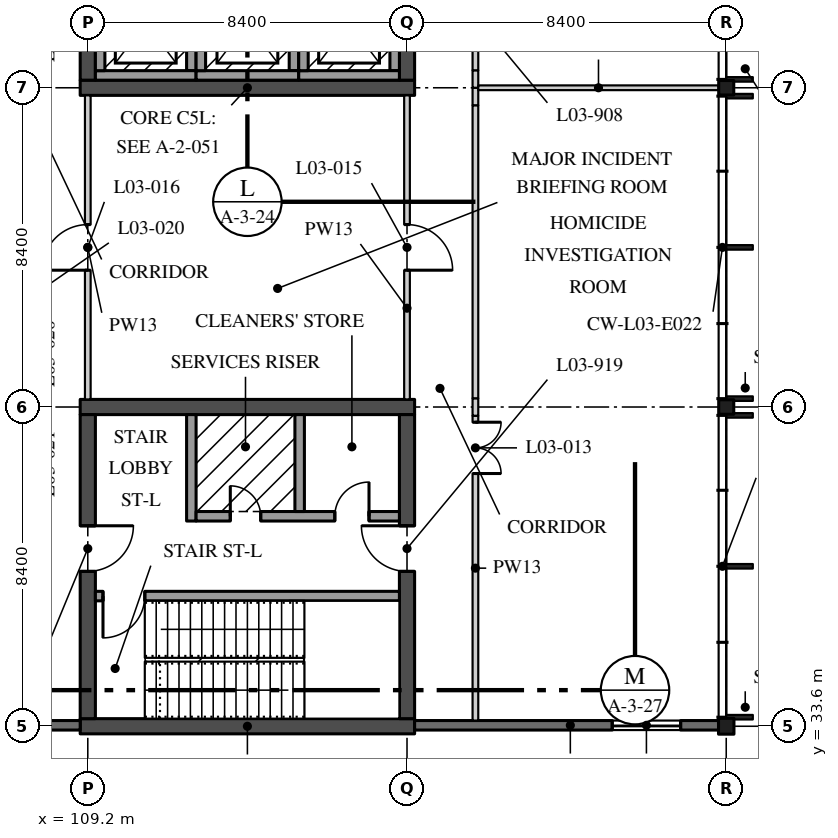
"""IFC4 building model, lengths in metres.
Left out: names, types, materials, properties, quantities, classifications, styles, units other than length and angle.
Written with IfcOpenShell. Run it as: python <this file> out.ifc"""

import sys

from ifc_helpers import new_model, si_unit, direction, frame, frame_2d, origin, origin_2d, place, context, subcontext, project, spatial, rectangle, i_section, extrude, element, fill, save


model = new_model("IFC4")
c1 = context("Model", 3, precision=1e-05, world=origin(), true_north=direction((0.0, 1.0)))
c2 = subcontext(c1, "Body", "Model", "MODEL_VIEW")
j1 = project(units=[si_unit("LENGTHUNIT", "METRE"), si_unit("PLANEANGLEUNIT", "RADIAN")], contexts=[c1])
p1 = place(None, origin())
s1 = spatial("IfcSite", under=j1, at=p1, CompositionType="ELEMENT")
p2 = place(p1, origin())
s2 = spatial("IfcBuilding", under=s1, at=p2, CompositionType="ELEMENT")
p3 = place(p2, frame((0.0, 0.0, 14.4)))
s3 = spatial("IfcBuildingStorey", under=s2, at=p3, CompositionType="ELEMENT", Elevation=14.4)
p4 = place(p3, frame((126.0, 33.6, 0.0), z_axis=(0.0, 0.0, 1.0), x_axis=(1.0, 0.0, 0.0)))
e1 = element("IfcColumn", 1, at=p4, inside=s3, PredefinedType="COLUMN", context=c2, shape_type="SweptSolid", body=[
    extrude(i_section(OverallWidth=0.406, OverallDepth=0.417, WebThickness=0.03, FlangeThickness=0.048, FilletRadius=0.015, at=origin_2d()), origin(), (0.0, 0.0, 1.0), 4.37),
])
for number, where, z_axis, x_axis in (
    (2, (126.0, 42.0, 0.0), (0.0, 0.0, 1.0), (1.0, 0.0, 0.0)),
    (3, (126.0, 50.4, 0.0), (0.0, 0.0, 1.0), (1.0, 0.0, 0.0)),
):
    element("IfcColumn", number, at=place(p3, frame(where, z_axis=z_axis, x_axis=x_axis)), inside=s3, PredefinedType="COLUMN", context=c2, shape_type="SweptSolid", body=[
        extrude(i_section(OverallWidth=0.396, OverallDepth=0.381, WebThickness=0.019, FlangeThickness=0.03, FilletRadius=0.015, at=origin_2d()), origin(), (0.0, 0.0, 1.0), 4.37),
    ])
p5 = place(p3, frame((109.0, 50.4, 0.0), z_axis=(0.0, 0.0, 1.0), x_axis=(1.0, 0.0, 0.0)))
e4 = element("IfcWall", 4, at=p5, inside=s3, PredefinedType="SHEAR", context=c2, shape_type="SweptSolid", body=[
    extrude(rectangle(XDim=8.8, YDim=0.4, at=frame_2d((4.4, 0.0))), origin(), (0.0, 0.0, 1.0), 4.37),
])
p6 = place(p3, frame((109.2, 50.6, 0.0), z_axis=(0.0, 0.0, 1.0), x_axis=(0.0, 1.0, 0.0)))
e5 = element("IfcWall", 5, at=p6, inside=s3, PredefinedType="SHEAR", context=c2, shape_type="SweptSolid", body=[
    extrude(rectangle(XDim=8.0, YDim=0.4, at=frame_2d((4.0, 0.0))), origin(), (0.0, 0.0, 1.0), 4.37),
])
p7 = place(p6, frame((3.25, 0.0, 0.0)))
e6 = element("IfcOpeningElement", 6, at=p7, cuts=e5, PredefinedType="OPENING", context=c2, shape_type="SweptSolid", body=[
    extrude(rectangle(XDim=1.2, YDim=2.1, at=frame_2d((0.6, 1.05))), frame((0.0, 0.21, 0.0), z_axis=(0.0, -1.0, 0.0), x_axis=(1.0, 0.0, 0.0)), (0.0, 0.0, 1.0), 0.42),
])
p8 = place(p3, frame((117.6, 50.6, 0.0), z_axis=(0.0, 0.0, 1.0), x_axis=(0.0, 1.0, 0.0)))
e7 = element("IfcWall", 7, at=p8, inside=s3, PredefinedType="SHEAR", context=c2, shape_type="SweptSolid", body=[
    extrude(rectangle(XDim=8.0, YDim=0.4, at=frame_2d((4.0, 0.0))), origin(), (0.0, 0.0, 1.0), 4.37),
])
p9 = place(p8, frame((3.25, 0.0, 0.0)))
e8 = element("IfcOpeningElement", 8, at=p9, cuts=e7, PredefinedType="OPENING", context=c2, shape_type="SweptSolid", body=[
    extrude(rectangle(XDim=1.2, YDim=2.1, at=frame_2d((0.6, 1.05))), frame((0.0, 0.21, 0.0), z_axis=(0.0, -1.0, 0.0), x_axis=(1.0, 0.0, 0.0)), (0.0, 0.0, 1.0), 0.42),
])
p10 = place(p8, frame((6.0, 0.0, 0.0)))
e9 = element("IfcOpeningElement", 9, at=p10, cuts=e7, PredefinedType="OPENING", context=c2, shape_type="SweptSolid", body=[
    extrude(rectangle(XDim=1.2, YDim=2.1, at=frame_2d((0.6, 1.05))), frame((0.0, 0.21, 0.0), z_axis=(0.0, -1.0, 0.0), x_axis=(1.0, 0.0, 0.0)), (0.0, 0.0, 1.0), 0.42),
])
for number, where, z_axis, x_axis in (
    (10, (109.0, 33.6, 0.0), (0.0, 0.0, 1.0), (1.0, 0.0, 0.0)),
    (11, (109.0, 42.0, 0.0), (0.0, 0.0, 1.0), (1.0, 0.0, 0.0)),
):
    element("IfcWall", number, at=place(p3, frame(where, z_axis=z_axis, x_axis=x_axis)), inside=s3, PredefinedType="SHEAR", context=c2, shape_type="SweptSolid", body=[
        extrude(rectangle(XDim=8.8, YDim=0.4, at=frame_2d((4.4, 0.0))), origin(), (0.0, 0.0, 1.0), 4.37),
    ])
p11 = place(p3, frame((109.2, 33.8, 0.0), z_axis=(0.0, 0.0, 1.0), x_axis=(0.0, 1.0, 0.0)))
e12 = element("IfcWall", 12, at=p11, inside=s3, PredefinedType="SHEAR", context=c2, shape_type="SweptSolid", body=[
    extrude(rectangle(XDim=8.0, YDim=0.4, at=frame_2d((4.0, 0.0))), origin(), (0.0, 0.0, 1.0), 4.37),
])
p12 = place(p11, frame((3.875, 0.0, 0.0)))
e13 = element("IfcOpeningElement", 13, at=p12, cuts=e12, PredefinedType="OPENING", context=c2, shape_type="SweptSolid", body=[
    extrude(rectangle(XDim=1.2, YDim=2.1, at=frame_2d((0.6, 1.05))), frame((0.0, 0.21, 0.0), z_axis=(0.0, -1.0, 0.0), x_axis=(1.0, 0.0, 0.0)), (0.0, 0.0, 1.0), 0.42),
])
p13 = place(p3, frame((117.6, 33.8, 0.0), z_axis=(0.0, 0.0, 1.0), x_axis=(0.0, 1.0, 0.0)))
e14 = element("IfcWall", 14, at=p13, inside=s3, PredefinedType="SHEAR", context=c2, shape_type="SweptSolid", body=[
    extrude(rectangle(XDim=8.0, YDim=0.4, at=frame_2d((4.0, 0.0))), origin(), (0.0, 0.0, 1.0), 4.37),
])
p14 = place(p13, frame((3.875, 0.0, 0.0)))
e15 = element("IfcOpeningElement", 15, at=p14, cuts=e14, PredefinedType="OPENING", context=c2, shape_type="SweptSolid", body=[
    extrude(rectangle(XDim=1.2, YDim=2.1, at=frame_2d((0.6, 1.05))), frame((0.0, 0.21, 0.0), z_axis=(0.0, -1.0, 0.0), x_axis=(1.0, 0.0, 0.0)), (0.0, 0.0, 1.0), 0.42),
])
p15 = place(p3, frame((109.4, 37.025, 0.0), z_axis=(0.0, 0.0, 1.0), x_axis=(1.0, 0.0, 0.0)))
e16 = element("IfcWall", 16, at=p15, inside=s3, PredefinedType="SOLIDWALL", context=c2, shape_type="SweptSolid", body=[
    extrude(rectangle(XDim=8.0, YDim=0.25, at=frame_2d((4.0, 0.0))), origin(), (0.0, 0.0, 1.0), 4.37),
])
p16 = place(p15, frame((0.2, 0.0, 0.0)))
e17 = element("IfcOpeningElement", 17, at=p16, cuts=e16, PredefinedType="OPENING", context=c2, shape_type="SweptSolid", body=[
    extrude(rectangle(XDim=1.1, YDim=2.1, at=frame_2d((0.55, 1.05))), frame((0.0, 0.135, 0.0), z_axis=(0.0, -1.0, 0.0), x_axis=(1.0, 0.0, 0.0)), (0.0, 0.0, 1.0), 0.27),
])
p17 = place(p3, frame((111.925, 39.0, 0.0), z_axis=(0.0, 0.0, 1.0), x_axis=(0.0, 1.0, 0.0)))
e18 = element("IfcWall", 18, at=p17, inside=s3, PredefinedType="SOLIDWALL", context=c2, shape_type="SweptSolid", body=[
    extrude(rectangle(XDim=2.8, YDim=0.25, at=frame_2d((1.4, 0.0))), origin(), (0.0, 0.0, 1.0), 4.37),
])
p18 = place(p3, frame((112.05, 39.125, 0.0), z_axis=(0.0, 0.0, 1.0), x_axis=(1.0, 0.0, 0.0)))
e19 = element("IfcWall", 19, at=p18, inside=s3, PredefinedType="SOLIDWALL", context=c2, shape_type="SweptSolid", body=[
    extrude(rectangle(XDim=5.35, YDim=0.25, at=frame_2d((2.675, 0.0))), origin(), (0.0, 0.0, 1.0), 4.37),
])
p19 = place(p18, frame((3.65, 0.0, 0.0)))
e20 = element("IfcOpeningElement", 20, at=p19, cuts=e19, PredefinedType="OPENING", context=c2, shape_type="SweptSolid", body=[
    extrude(rectangle(XDim=0.9, YDim=2.1, at=frame_2d((0.45, 1.05))), frame((0.0, 0.135, 0.0), z_axis=(0.0, -1.0, 0.0), x_axis=(1.0, 0.0, 0.0)), (0.0, 0.0, 1.0), 0.27),
])
p20 = place(p18, frame((0.9, 0.0, 0.0)))
e21 = element("IfcOpeningElement", 21, at=p20, cuts=e19, PredefinedType="OPENING", context=c2, shape_type="SweptSolid", body=[
    extrude(rectangle(XDim=0.8, YDim=2.1, at=frame_2d((0.4, 1.05))), frame((0.0, 0.135, 0.0), z_axis=(0.0, -1.0, 0.0), x_axis=(1.0, 0.0, 0.0)), (0.0, 0.0, 1.0), 0.27),
])
p21 = place(p3, frame((114.775, 39.25, 0.0), z_axis=(0.0, 0.0, 1.0), x_axis=(0.0, 1.0, 0.0)))
e22 = element("IfcWall", 22, at=p21, inside=s3, PredefinedType="SOLIDWALL", context=c2, shape_type="SweptSolid", body=[
    extrude(rectangle(XDim=2.55, YDim=0.25, at=frame_2d((1.275, 0.0))), origin(), (0.0, 0.0, 1.0), 4.37),
])
p22 = place(p3, frame((111.925, 50.85, 0.0), z_axis=(0.0, 0.0, 1.0), x_axis=(0.0, 1.0, 0.0)))
e23 = element("IfcWall", 23, at=p22, inside=s3, PredefinedType="SOLIDWALL", context=c2, shape_type="SweptSolid", body=[
    extrude(rectangle(XDim=2.3, YDim=0.25, at=frame_2d((1.15, 0.0))), origin(), (0.0, 0.0, 1.0), 4.37),
])
p23 = place(p3, frame((109.4, 50.725, 0.0), z_axis=(0.0, 0.0, 1.0), x_axis=(1.0, 0.0, 0.0)))
e24 = element("IfcWall", 24, at=p23, inside=s3, PredefinedType="SOLIDWALL", context=c2, shape_type="SweptSolid", body=[
    extrude(rectangle(XDim=2.65, YDim=0.25, at=frame_2d((1.325, 0.0))), origin(), (0.0, 0.0, 1.0), 4.37),
])
for number, where, z_axis, x_axis in (
    (25, (109.525, 50.85, 0.0), (0.0, 0.0, 1.0), (0.0, 1.0, 0.0)),
    (26, (114.625, 50.85, 0.0), (0.0, 0.0, 1.0), (0.0, 1.0, 0.0)),
):
    element("IfcWall", number, at=place(p3, frame(where, z_axis=z_axis, x_axis=x_axis)), inside=s3, PredefinedType="SOLIDWALL", context=c2, shape_type="SweptSolid", body=[
        extrude(rectangle(XDim=2.3, YDim=0.25, at=frame_2d((1.15, 0.0))), origin(), (0.0, 0.0, 1.0), 4.37),
    ])
p24 = place(p3, frame((112.05, 50.725, 0.0), z_axis=(0.0, 0.0, 1.0), x_axis=(1.0, 0.0, 0.0)))
e27 = element("IfcWall", 27, at=p24, inside=s3, PredefinedType="SOLIDWALL", context=c2, shape_type="SweptSolid", body=[
    extrude(rectangle(XDim=2.7, YDim=0.25, at=frame_2d((1.35, 0.0))), origin(), (0.0, 0.0, 1.0), 4.37),
])
for number, where, z_axis, x_axis in (
    (28, (112.175, 50.85, 0.0), (0.0, 0.0, 1.0), (0.0, 1.0, 0.0)),
    (29, (117.275, 50.85, 0.0), (0.0, 0.0, 1.0), (0.0, 1.0, 0.0)),
):
    element("IfcWall", number, at=place(p3, frame(where, z_axis=z_axis, x_axis=x_axis)), inside=s3, PredefinedType="SOLIDWALL", context=c2, shape_type="SweptSolid", body=[
        extrude(rectangle(XDim=2.3, YDim=0.25, at=frame_2d((1.15, 0.0))), origin(), (0.0, 0.0, 1.0), 4.37),
    ])
p25 = place(p3, frame((114.75, 50.725, 0.0), z_axis=(0.0, 0.0, 1.0), x_axis=(1.0, 0.0, 0.0)))
e30 = element("IfcWall", 30, at=p25, inside=s3, PredefinedType="SOLIDWALL", context=c2, shape_type="SweptSolid", body=[
    extrude(rectangle(XDim=2.65, YDim=0.25, at=frame_2d((1.325, 0.0))), origin(), (0.0, 0.0, 1.0), 4.37),
])
p26 = place(p3, frame((114.875, 50.85, 0.0), z_axis=(0.0, 0.0, 1.0), x_axis=(0.0, 1.0, 0.0)))
e31 = element("IfcWall", 31, at=p26, inside=s3, PredefinedType="SOLIDWALL", context=c2, shape_type="SweptSolid", body=[
    extrude(rectangle(XDim=2.3, YDim=0.25, at=frame_2d((1.15, 0.0))), origin(), (0.0, 0.0, 1.0), 4.37),
])
p27 = place(p3, frame((119.4, 33.75, 0.0), z_axis=(0.0, 0.0, 1.0), x_axis=(0.0, 1.0, 0.0)))
e32 = element("IfcWall", 32, at=p27, inside=s3, PredefinedType="PARTITIONING", context=c2, shape_type="SweptSolid", body=[
    extrude(rectangle(XDim=8.02, YDim=0.15, at=frame_2d((4.01, 0.0))), origin(), (0.0, 0.0, 1.0), 4.37),
])
p28 = place(p27, frame((6.5, 0.0, 0.0)))
e33 = element("IfcOpeningElement", 33, at=p28, cuts=e32, PredefinedType="OPENING", context=c2, shape_type="SweptSolid", body=[
    extrude(rectangle(XDim=1.35, YDim=2.1, at=frame_2d((0.675, 1.05))), frame((0.0, 0.085, 0.0), z_axis=(0.0, -1.0, 0.0), x_axis=(1.0, 0.0, 0.0)), (0.0, 0.0, 1.0), 0.17),
])
p29 = place(p3, frame((119.4, 41.77, 0.0), z_axis=(0.0, 0.0, 1.0), x_axis=(0.0, 1.0, 0.0)))
e34 = element("IfcWall", 34, at=p29, inside=s3, PredefinedType="PARTITIONING", context=c2, shape_type="SweptSolid", body=[
    extrude(rectangle(XDim=0.46, YDim=0.15, at=frame_2d((0.23, 0.0))), origin(), (0.0, 0.0, 1.0), 3.746),
])
p30 = place(p3, frame((119.4, 42.23, 0.0), z_axis=(0.0, 0.0, 1.0), x_axis=(0.0, 1.0, 0.0)))
e35 = element("IfcWall", 35, at=p30, inside=s3, PredefinedType="PARTITIONING", context=c2, shape_type="SweptSolid", body=[
    extrude(rectangle(XDim=7.71, YDim=0.15, at=frame_2d((3.855, 0.0))), origin(), (0.0, 0.0, 1.0), 4.37),
])
p31 = place(p3, frame((119.4, 49.94, 0.0), z_axis=(0.0, 0.0, 1.0), x_axis=(0.0, 1.0, 0.0)))
e36 = element("IfcWall", 36, at=p31, inside=s3, PredefinedType="PARTITIONING", context=c2, shape_type="SweptSolid", body=[
    extrude(rectangle(XDim=0.46, YDim=0.15, at=frame_2d((0.23, 0.0))), origin(), (0.0, 0.0, 1.0), 3.746),
])
p32 = place(p3, frame((119.4, 50.4, 0.0), z_axis=(0.0, 0.0, 1.0), x_axis=(0.0, 1.0, 0.0)))
e37 = element("IfcWall", 37, at=p32, inside=s3, PredefinedType="PARTITIONING", context=c2, shape_type="SweptSolid", body=[
    extrude(rectangle(XDim=0.46, YDim=0.15, at=frame_2d((0.23, 0.0))), origin(), (0.0, 0.0, 1.0), 3.746),
])
p33 = place(p3, frame((119.4, 50.86, 0.0), z_axis=(0.0, 0.0, 1.0), x_axis=(0.0, 1.0, 0.0)))
e38 = element("IfcWall", 38, at=p33, inside=s3, PredefinedType="PARTITIONING", context=c2, shape_type="SweptSolid", body=[
    extrude(rectangle(XDim=7.71, YDim=0.15, at=frame_2d((3.855, 0.0))), origin(), (0.0, 0.0, 1.0), 4.37),
])
p34 = place(p3, frame((117.6, 42.2, 0.0), z_axis=(0.0, 0.0, 1.0), x_axis=(0.0, 1.0, 0.0)))
e39 = element("IfcWall", 39, at=p34, inside=s3, PredefinedType="PARTITIONING", context=c2, shape_type="SweptSolid", body=[
    extrude(rectangle(XDim=8.0, YDim=0.15, at=frame_2d((4.0, 0.0))), origin(), (0.0, 0.0, 1.0), 3.746),
])
p35 = place(p34, frame((3.4, 0.0, 0.0)))
e40 = element("IfcOpeningElement", 40, at=p35, cuts=e39, PredefinedType="OPENING", context=c2, shape_type="SweptSolid", body=[
    extrude(rectangle(XDim=1.2, YDim=2.4, at=frame_2d((0.6, 1.2))), frame((0.0, 0.085, 0.0), z_axis=(0.0, -1.0, 0.0), x_axis=(1.0, 0.0, 0.0)), (0.0, 0.0, 1.0), 0.17),
])
p36 = place(p3, frame((109.2, 42.2, 0.0), z_axis=(0.0, 0.0, 1.0), x_axis=(0.0, 1.0, 0.0)))
e41 = element("IfcWall", 41, at=p36, inside=s3, PredefinedType="PARTITIONING", context=c2, shape_type="SweptSolid", body=[
    extrude(rectangle(XDim=8.0, YDim=0.15, at=frame_2d((4.0, 0.0))), origin(), (0.0, 0.0, 1.0), 3.746),
])
p37 = place(p36, frame((3.4, 0.0, 0.0)))
e42 = element("IfcOpeningElement", 42, at=p37, cuts=e41, PredefinedType="OPENING", context=c2, shape_type="SweptSolid", body=[
    extrude(rectangle(XDim=1.2, YDim=2.4, at=frame_2d((0.6, 1.2))), frame((0.0, 0.085, 0.0), z_axis=(0.0, -1.0, 0.0), x_axis=(1.0, 0.0, 0.0)), (0.0, 0.0, 1.0), 0.17),
])
p38 = place(p3, frame((119.475, 50.4, 0.0), z_axis=(0.0, 0.0, 1.0), x_axis=(1.0, 0.0, 0.0)))
e43 = element("IfcWall", 43, at=p38, inside=s3, PredefinedType="PARTITIONING", context=c2, shape_type="SweptSolid", body=[
    extrude(rectangle(XDim=6.327, YDim=0.125, at=frame_2d((3.164, 0.0))), origin(), (0.0, 0.0, 1.0), 3.746),
])
p39 = place(p3, frame((100.802, 33.625, 0.0), z_axis=(0.0, 0.0, 1.0), x_axis=(1.0, 0.0, 0.0)))
e44 = element("IfcWall", 44, at=p39, inside=s3, PredefinedType="SOLIDWALL", context=c2, shape_type="SweptSolid", body=[
    extrude(rectangle(XDim=8.198, YDim=0.25, at=frame_2d((4.099, 0.0))), origin(), (0.0, 0.0, 1.0), 3.746),
])
p40 = place(p39, frame((0.898, 0.0, 0.9)))
e45 = element("IfcOpeningElement", 45, at=p40, cuts=e44, PredefinedType="OPENING", context=c2, shape_type="SweptSolid", body=[
    extrude(rectangle(XDim=2.4, YDim=2.1, at=frame_2d((1.2, 1.05))), frame((0.0, 0.135, 0.0), z_axis=(0.0, -1.0, 0.0), x_axis=(1.0, 0.0, 0.0)), (0.0, 0.0, 1.0), 0.27),
])
p41 = place(p3, frame((117.8, 33.625, 0.0), z_axis=(0.0, 0.0, 1.0), x_axis=(1.0, 0.0, 0.0)))
e46 = element("IfcWall", 46, at=p41, inside=s3, PredefinedType="SOLIDWALL", context=c2, shape_type="SweptSolid", body=[
    extrude(rectangle(XDim=8.195, YDim=0.25, at=frame_2d((4.098, 0.0))), origin(), (0.0, 0.0, 1.0), 3.746),
])
p42 = place(p41, frame((5.2, 0.0, 0.9)))
e47 = element("IfcOpeningElement", 47, at=p42, cuts=e46, PredefinedType="OPENING", context=c2, shape_type="SweptSolid", body=[
    extrude(rectangle(XDim=1.8, YDim=2.1, at=frame_2d((0.9, 1.05))), frame((0.0, 0.135, 0.0), z_axis=(0.0, -1.0, 0.0), x_axis=(1.0, 0.0, 0.0)), (0.0, 0.0, 1.0), 0.27),
])
p43 = place(p19, origin())
e48 = element("IfcDoor", 48, at=p43, inside=s3, OperationType="SINGLE_SWING_LEFT", PredefinedType="DOOR", context=c2, shape_type="SweptSolid", body=[
    extrude(rectangle(XDim=0.9, YDim=2.1, at=frame_2d((0.45, 1.05))), frame((0.0, 0.035, 0.0), z_axis=(0.0, -1.0, 0.0), x_axis=(1.0, 0.0, 0.0)), (0.0, 0.0, 1.0), 0.07),
])
fill(e20, e48)
p44 = place(p12, frame((1.2, 0.0, 0.0), z_axis=(0.0, 0.0, 1.0), x_axis=(-1.0, 0.0, 0.0)))
e49 = element("IfcDoor", 49, at=p44, inside=s3, OperationType="SINGLE_SWING_RIGHT", PredefinedType="DOOR", context=c2, shape_type="SweptSolid", body=[
    extrude(rectangle(XDim=1.2, YDim=2.1, at=frame_2d((0.6, 1.05))), frame((0.0, 0.035, 0.0), z_axis=(0.0, -1.0, 0.0), x_axis=(1.0, 0.0, 0.0)), (0.0, 0.0, 1.0), 0.07),
])
fill(e13, e49)
p45 = place(p14, origin())
e50 = element("IfcDoor", 50, at=p45, inside=s3, OperationType="SINGLE_SWING_LEFT", PredefinedType="DOOR", context=c2, shape_type="SweptSolid", body=[
    extrude(rectangle(XDim=1.2, YDim=2.1, at=frame_2d((0.6, 1.05))), frame((0.0, 0.035, 0.0), z_axis=(0.0, -1.0, 0.0), x_axis=(1.0, 0.0, 0.0)), (0.0, 0.0, 1.0), 0.07),
])
fill(e15, e50)
p46 = place(p20, origin())
e51 = element("IfcDoor", 51, at=p46, inside=s3, OperationType="SINGLE_SWING_RIGHT", PredefinedType="DOOR", context=c2, shape_type="SweptSolid", body=[
    extrude(rectangle(XDim=0.8, YDim=2.1, at=frame_2d((0.4, 1.05))), frame((0.0, 0.035, 0.0), z_axis=(0.0, -1.0, 0.0), x_axis=(1.0, 0.0, 0.0)), (0.0, 0.0, 1.0), 0.07),
])
fill(e21, e51)
p47 = place(p16, frame((1.1, 0.0, 0.0), z_axis=(0.0, 0.0, 1.0), x_axis=(-1.0, 0.0, 0.0)))
e52 = element("IfcDoor", 52, at=p47, inside=s3, OperationType="SINGLE_SWING_LEFT", PredefinedType="DOOR", context=c2, shape_type="SweptSolid", body=[
    extrude(rectangle(XDim=1.1, YDim=2.1, at=frame_2d((0.55, 1.05))), frame((0.0, 0.035, 0.0), z_axis=(0.0, -1.0, 0.0), x_axis=(1.0, 0.0, 0.0)), (0.0, 0.0, 1.0), 0.07),
])
fill(e17, e52)
p48 = place(p28, frame((1.35, 0.0, 0.0), z_axis=(0.0, 0.0, 1.0), x_axis=(-1.0, 0.0, 0.0)))
e53 = element("IfcDoor", 53, at=p48, inside=s3, OperationType="DOUBLE_DOOR_SINGLE_SWING", PredefinedType="DOOR", context=c2, shape_type="SweptSolid", body=[
    extrude(rectangle(XDim=1.35, YDim=2.1, at=frame_2d((0.675, 1.05))), frame((0.0, 0.025, 0.0), z_axis=(0.0, -1.0, 0.0), x_axis=(1.0, 0.0, 0.0)), (0.0, 0.0, 1.0), 0.05),
])
fill(e33, e53)
p49 = place(p35, frame((1.2, 0.0, 0.0), z_axis=(0.0, 0.0, 1.0), x_axis=(-1.0, 0.0, 0.0)))
e54 = element("IfcDoor", 54, at=p49, inside=s3, OperationType="SINGLE_SWING_LEFT", PredefinedType="DOOR", context=c2, shape_type="SweptSolid", body=[
    extrude(rectangle(XDim=1.2, YDim=2.4, at=frame_2d((0.6, 1.2))), frame((0.0, 0.025, 0.0), z_axis=(0.0, -1.0, 0.0), x_axis=(1.0, 0.0, 0.0)), (0.0, 0.0, 1.0), 0.05),
])
fill(e40, e54)
p50 = place(p37, origin())
e55 = element("IfcDoor", 55, at=p50, inside=s3, OperationType="SINGLE_SWING_RIGHT", PredefinedType="DOOR", context=c2, shape_type="SweptSolid", body=[
    extrude(rectangle(XDim=1.2, YDim=2.4, at=frame_2d((0.6, 1.2))), frame((0.0, 0.025, 0.0), z_axis=(0.0, -1.0, 0.0), x_axis=(1.0, 0.0, 0.0)), (0.0, 0.0, 1.0), 0.05),
])
fill(e42, e55)
p51 = place(p42, origin())
e56 = element("IfcWindow", 56, at=p51, inside=s3, PartitioningType="SINGLE_PANEL", PredefinedType="WINDOW", context=c2, shape_type="SweptSolid", body=[
    extrude(rectangle(XDim=1.8, YDim=2.1, at=frame_2d((0.9, 1.05))), frame((0.0, 0.04, 0.0), z_axis=(0.0, -1.0, 0.0), x_axis=(1.0, 0.0, 0.0)), (0.0, 0.0, 1.0), 0.08),
])
fill(e47, e56)
save(model, sys.argv[1])
